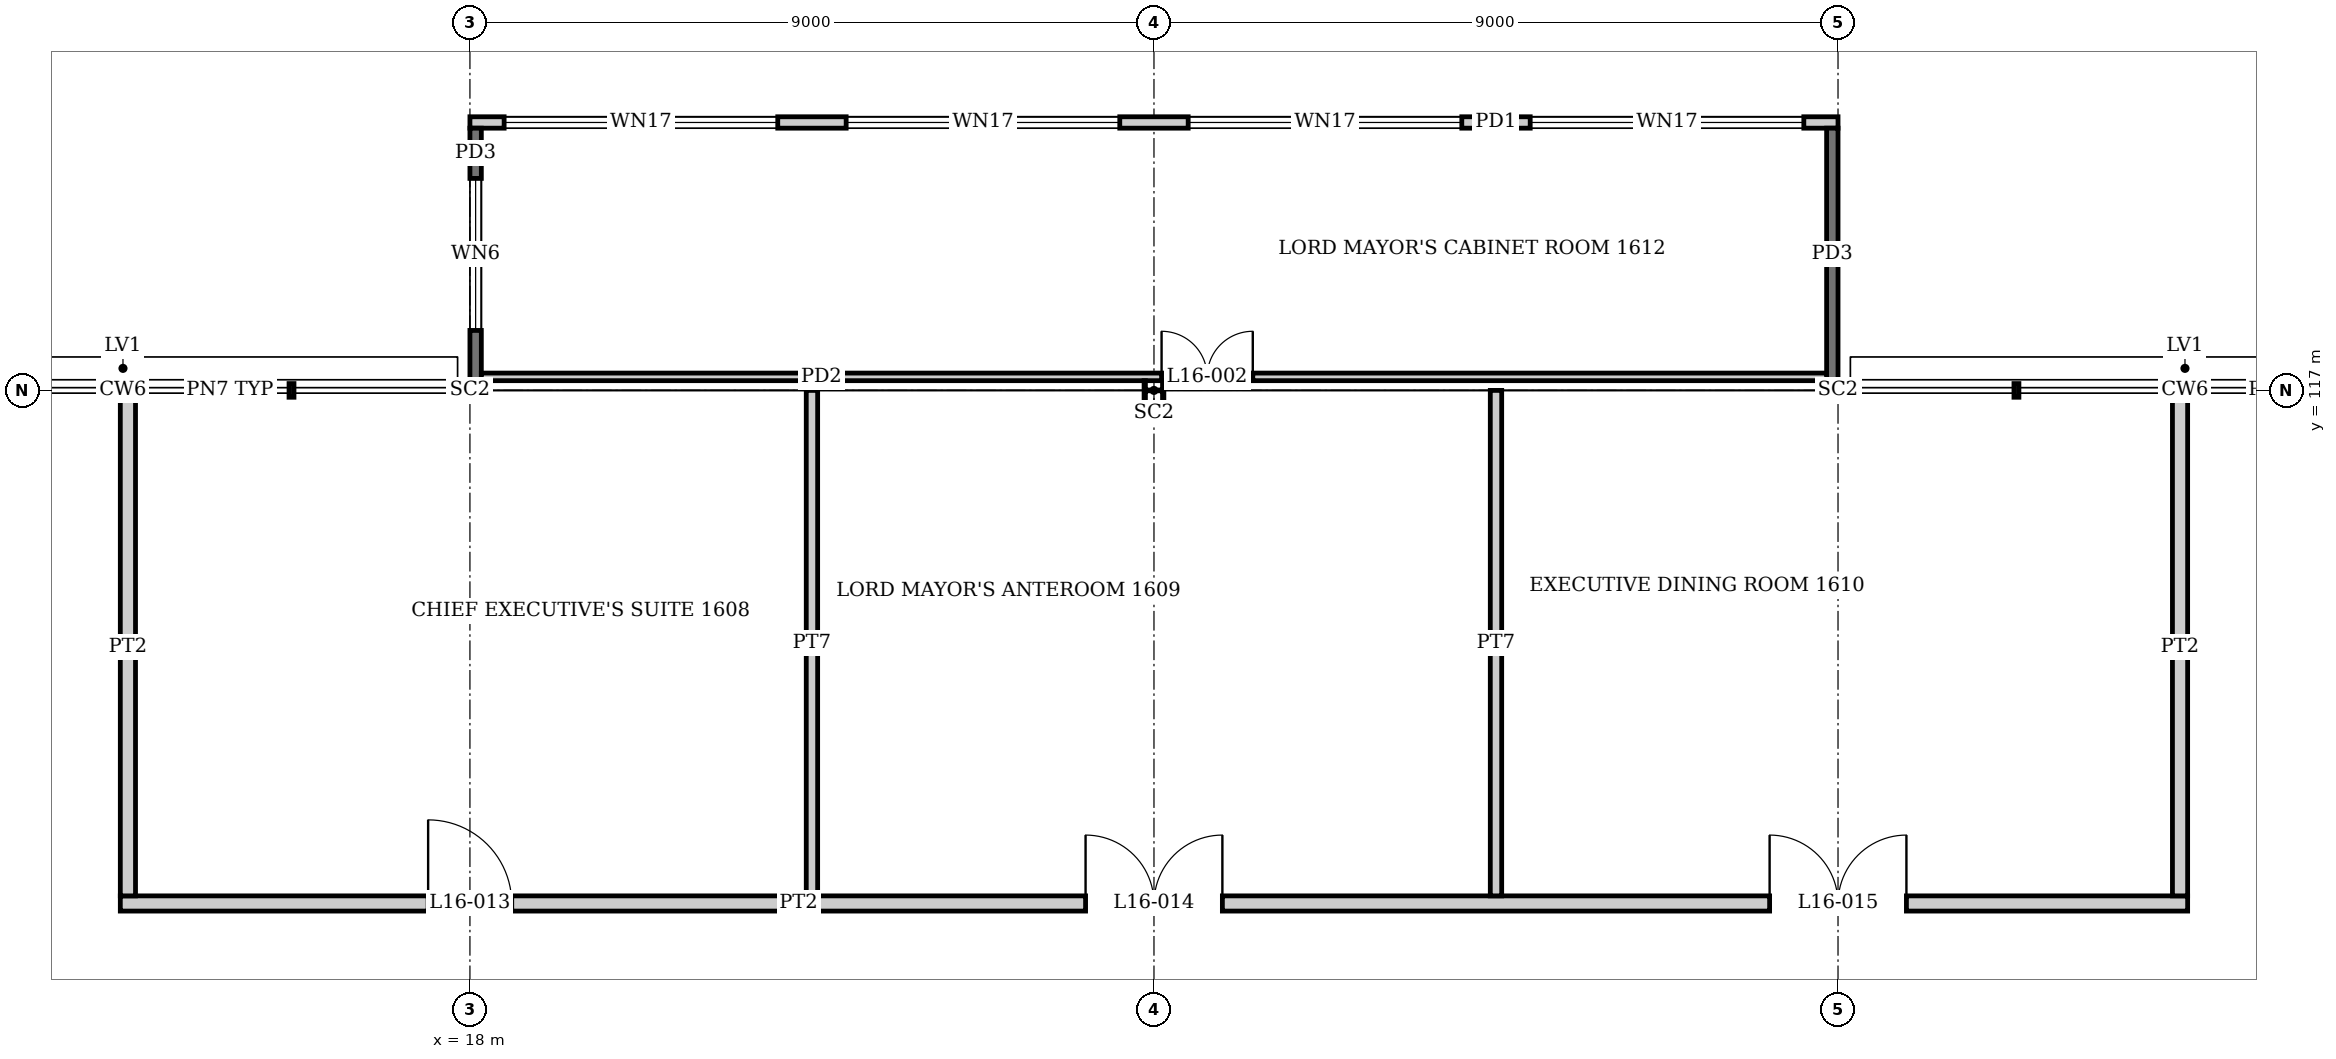
"""IFC4 building model, lengths in metres.
Left out: names, types, materials, properties, quantities, classifications, styles, units other than length and angle.
Written with IfcOpenShell. Run it as: python <this file> out.ifc"""

import sys

from ifc_helpers import new_model, si_unit, direction, frame, frame_2d, origin, origin_2d, place, context, subcontext, project, spatial, rectangle, i_section, extrude, element, fill, save


model = new_model("IFC4")
c1 = context("Model", 3, precision=1e-05, world=origin(), true_north=direction((0.0, 1.0)))
c2 = subcontext(c1, "Body", "Model", "MODEL_VIEW")
j1 = project(units=[si_unit("LENGTHUNIT", "METRE"), si_unit("PLANEANGLEUNIT", "RADIAN")], contexts=[c1])
p1 = place(None, origin())
s1 = spatial("IfcSite", under=j1, at=p1, CompositionType="ELEMENT")
p2 = place(p1, origin())
s2 = spatial("IfcBuilding", under=s1, at=p2, CompositionType="ELEMENT")
p3 = place(p2, frame((0.0, 0.0, 67.2)))
s3 = spatial("IfcBuildingStorey", under=s2, at=p3, CompositionType="ELEMENT", Elevation=67.2)
for number, where, z_axis, x_axis in (
    (1, (18.0, 117.0, 0.0), (0.0, 0.0, 1.0), (0.0, 1.0, 0.0)),
    (2, (27.0, 117.0, 0.0), (0.0, 0.0, 1.0), (0.0, 1.0, 0.0)),
    (3, (36.0, 117.0, 0.0), (0.0, 0.0, 1.0), (0.0, 1.0, 0.0)),
):
    element("IfcColumn", number, at=place(p3, frame(where, z_axis=z_axis, x_axis=x_axis)), inside=s3, PredefinedType="COLUMN", context=c2, shape_type="SweptSolid", body=[
        extrude(i_section(OverallWidth=0.256, OverallDepth=0.26, WebThickness=0.01, FlangeThickness=0.017, at=origin_2d()), origin(), (0.0, 0.0, 1.0), 4.0),
    ])
p4 = place(p3, frame((18.0, 120.525, 0.0), z_axis=(0.0, 0.0, 1.0), x_axis=(1.0, 0.0, 0.0)))
e4 = element("IfcWall", 4, at=p4, inside=s3, PredefinedType="SOLIDWALL", context=c2, shape_type="SweptSolid", body=[
    extrude(rectangle(XDim=18.0, YDim=0.15, at=frame_2d((9.0, 0.0))), origin(), (0.0, 0.0, 1.0), 2.6),
])
p5 = place(p4, frame((0.45, 0.0, 0.6)))
e5 = element("IfcOpeningElement", 5, at=p5, cuts=e4, PredefinedType="OPENING", context=c2, shape_type="SweptSolid", body=[
    extrude(rectangle(XDim=3.6, YDim=1.8, at=frame_2d((1.8, 0.9))), frame((0.0, 0.085, 0.0), z_axis=(0.0, -1.0, 0.0), x_axis=(1.0, 0.0, 0.0)), (0.0, 0.0, 1.0), 0.17),
])
p6 = place(p4, frame((4.95, 0.0, 0.6)))
e6 = element("IfcOpeningElement", 6, at=p6, cuts=e4, PredefinedType="OPENING", context=c2, shape_type="SweptSolid", body=[
    extrude(rectangle(XDim=3.6, YDim=1.8, at=frame_2d((1.8, 0.9))), frame((0.0, 0.085, 0.0), z_axis=(0.0, -1.0, 0.0), x_axis=(1.0, 0.0, 0.0)), (0.0, 0.0, 1.0), 0.17),
])
p7 = place(p4, frame((9.45, 0.0, 0.6)))
e7 = element("IfcOpeningElement", 7, at=p7, cuts=e4, PredefinedType="OPENING", context=c2, shape_type="SweptSolid", body=[
    extrude(rectangle(XDim=3.6, YDim=1.8, at=frame_2d((1.8, 0.9))), frame((0.0, 0.085, 0.0), z_axis=(0.0, -1.0, 0.0), x_axis=(1.0, 0.0, 0.0)), (0.0, 0.0, 1.0), 0.17),
])
p8 = place(p4, frame((13.95, 0.0, 0.6)))
e8 = element("IfcOpeningElement", 8, at=p8, cuts=e4, PredefinedType="OPENING", context=c2, shape_type="SweptSolid", body=[
    extrude(rectangle(XDim=3.6, YDim=1.8, at=frame_2d((1.8, 0.9))), frame((0.0, 0.085, 0.0), z_axis=(0.0, -1.0, 0.0), x_axis=(1.0, 0.0, 0.0)), (0.0, 0.0, 1.0), 0.17),
])
p9 = place(p3, frame((18.075, 120.45, -0.15), z_axis=(0.0, 0.0, 1.0), x_axis=(0.0, -1.0, 0.0)))
e9 = element("IfcWall", 9, at=p9, inside=s3, PredefinedType="SOLIDWALL", context=c2, shape_type="SweptSolid", body=[
    extrude(rectangle(XDim=3.322, YDim=0.15, at=frame_2d((1.661, 0.0))), origin(), (0.0, 0.0, 1.0), 2.75),
])
p10 = place(p9, frame((0.661, 0.0, 1.05)))
e10 = element("IfcOpeningElement", 10, at=p10, cuts=e9, PredefinedType="OPENING", context=c2, shape_type="SweptSolid", body=[
    extrude(rectangle(XDim=2.0, YDim=1.4, at=frame_2d((1.0, 0.7))), frame((0.0, 0.085, 0.0), z_axis=(0.0, -1.0, 0.0), x_axis=(1.0, 0.0, 0.0)), (0.0, 0.0, 1.0), 0.17),
])
p11 = place(p3, frame((35.925, 120.45, -0.15), z_axis=(0.0, 0.0, 1.0), x_axis=(0.0, -1.0, 0.0)))
e11 = element("IfcWall", 11, at=p11, inside=s3, PredefinedType="SOLIDWALL", context=c2, shape_type="SweptSolid", body=[
    extrude(rectangle(XDim=3.322, YDim=0.15, at=frame_2d((1.661, 0.0))), origin(), (0.0, 0.0, 1.0), 2.75),
])
p12 = place(p3, frame((18.15, 117.178, 0.0), z_axis=(0.0, 0.0, 1.0), x_axis=(1.0, 0.0, 0.0)))
e12 = element("IfcWall", 12, at=p12, inside=s3, PredefinedType="PARTITIONING", context=c2, shape_type="SweptSolid", body=[
    extrude(rectangle(XDim=17.7, YDim=0.1, at=frame_2d((8.85, 0.0))), origin(), (0.0, 0.0, 1.0), 2.6),
])
p13 = place(p12, frame((8.95, 0.0, 0.0)))
e13 = element("IfcOpeningElement", 13, at=p13, cuts=e12, PredefinedType="OPENING", context=c2, shape_type="SweptSolid", body=[
    extrude(rectangle(XDim=1.2, YDim=2.1, at=frame_2d((0.6, 1.05))), frame((0.0, 0.06, 0.0), z_axis=(0.0, -1.0, 0.0), x_axis=(1.0, 0.0, 0.0)), (0.0, 0.0, 1.0), 0.12),
])
p14 = place(p3, frame((13.4, 110.25, 0.0), z_axis=(0.0, 0.0, 1.0), x_axis=(1.0, 0.0, 0.0)))
e14 = element("IfcWall", 14, at=p14, inside=s3, PredefinedType="PARTITIONING", context=c2, shape_type="SweptSolid", body=[
    extrude(rectangle(XDim=27.2, YDim=0.2, at=frame_2d((13.6, 0.0))), origin(), (0.0, 0.0, 1.0), 2.9),
])
p15 = place(p14, frame((4.05, 0.0, 0.0)))
e15 = element("IfcOpeningElement", 15, at=p15, cuts=e14, PredefinedType="OPENING", context=c2, shape_type="SweptSolid", body=[
    extrude(rectangle(XDim=1.1, YDim=2.4, at=frame_2d((0.55, 1.2))), frame((0.0, 0.11, 0.0), z_axis=(0.0, -1.0, 0.0), x_axis=(1.0, 0.0, 0.0)), (0.0, 0.0, 1.0), 0.22),
])
p16 = place(p14, frame((12.7, 0.0, 0.0)))
e16 = element("IfcOpeningElement", 16, at=p16, cuts=e14, PredefinedType="OPENING", context=c2, shape_type="SweptSolid", body=[
    extrude(rectangle(XDim=1.8, YDim=2.1, at=frame_2d((0.9, 1.05))), frame((0.0, 0.11, 0.0), z_axis=(0.0, -1.0, 0.0), x_axis=(1.0, 0.0, 0.0)), (0.0, 0.0, 1.0), 0.22),
])
p17 = place(p14, frame((21.7, 0.0, 0.0)))
e17 = element("IfcOpeningElement", 17, at=p17, cuts=e14, PredefinedType="OPENING", context=c2, shape_type="SweptSolid", body=[
    extrude(rectangle(XDim=1.8, YDim=2.1, at=frame_2d((0.9, 1.05))), frame((0.0, 0.11, 0.0), z_axis=(0.0, -1.0, 0.0), x_axis=(1.0, 0.0, 0.0)), (0.0, 0.0, 1.0), 0.22),
])
p18 = place(p3, frame((13.5, 110.35, 0.0), z_axis=(0.0, 0.0, 1.0), x_axis=(0.0, 1.0, 0.0)))
e18 = element("IfcWall", 18, at=p18, inside=s3, PredefinedType="PARTITIONING", context=c2, shape_type="SweptSolid", body=[
    extrude(rectangle(XDim=6.56, YDim=0.2, at=frame_2d((3.28, 0.0))), origin(), (0.0, 0.0, 1.0), 2.9),
])
for number, where, z_axis, x_axis in (
    (19, (22.5, 110.35, 0.0), (0.0, 0.0, 1.0), (0.0, 1.0, 0.0)),
    (20, (31.5, 110.35, 0.0), (0.0, 0.0, 1.0), (0.0, 1.0, 0.0)),
):
    element("IfcWall", number, at=place(p3, frame(where, z_axis=z_axis, x_axis=x_axis)), inside=s3, PredefinedType="PARTITIONING", context=c2, shape_type="SweptSolid", body=[
        extrude(rectangle(XDim=6.65, YDim=0.15, at=frame_2d((3.325, 0.0))), origin(), (0.0, 0.0, 1.0), 2.9),
    ])
p19 = place(p3, frame((40.5, 110.35, 0.0), z_axis=(0.0, 0.0, 1.0), x_axis=(0.0, 1.0, 0.0)))
e21 = element("IfcWall", 21, at=p19, inside=s3, PredefinedType="PARTITIONING", context=c2, shape_type="SweptSolid", body=[
    extrude(rectangle(XDim=6.56, YDim=0.2, at=frame_2d((3.28, 0.0))), origin(), (0.0, 0.0, 1.0), 2.9),
])
p20 = place(p5, origin())
e22 = element("IfcWindow", 22, at=p20, inside=s3, PartitioningType="SINGLE_PANEL", PredefinedType="WINDOW", context=c2, shape_type="SweptSolid", body=[
    extrude(rectangle(XDim=3.6, YDim=1.8, at=frame_2d((1.8, 0.9))), frame((0.0, 0.03, 0.0), z_axis=(0.0, -1.0, 0.0), x_axis=(1.0, 0.0, 0.0)), (0.0, 0.0, 1.0), 0.06),
])
fill(e5, e22)
p21 = place(p6, origin())
e23 = element("IfcWindow", 23, at=p21, inside=s3, PartitioningType="SINGLE_PANEL", PredefinedType="WINDOW", context=c2, shape_type="SweptSolid", body=[
    extrude(rectangle(XDim=3.6, YDim=1.8, at=frame_2d((1.8, 0.9))), frame((0.0, 0.03, 0.0), z_axis=(0.0, -1.0, 0.0), x_axis=(1.0, 0.0, 0.0)), (0.0, 0.0, 1.0), 0.06),
])
fill(e6, e23)
p22 = place(p7, origin())
e24 = element("IfcWindow", 24, at=p22, inside=s3, PartitioningType="SINGLE_PANEL", PredefinedType="WINDOW", context=c2, shape_type="SweptSolid", body=[
    extrude(rectangle(XDim=3.6, YDim=1.8, at=frame_2d((1.8, 0.9))), frame((0.0, 0.03, 0.0), z_axis=(0.0, -1.0, 0.0), x_axis=(1.0, 0.0, 0.0)), (0.0, 0.0, 1.0), 0.06),
])
fill(e7, e24)
p23 = place(p8, origin())
e25 = element("IfcWindow", 25, at=p23, inside=s3, PartitioningType="SINGLE_PANEL", PredefinedType="WINDOW", context=c2, shape_type="SweptSolid", body=[
    extrude(rectangle(XDim=3.6, YDim=1.8, at=frame_2d((1.8, 0.9))), frame((0.0, 0.03, 0.0), z_axis=(0.0, -1.0, 0.0), x_axis=(1.0, 0.0, 0.0)), (0.0, 0.0, 1.0), 0.06),
])
fill(e8, e25)
p24 = place(p10, origin())
e26 = element("IfcWindow", 26, at=p24, inside=s3, PartitioningType="SINGLE_PANEL", PredefinedType="WINDOW", context=c2, shape_type="SweptSolid", body=[
    extrude(rectangle(XDim=2.0, YDim=1.4, at=frame_2d((1.0, 0.7))), frame((0.0, 0.03, 0.0), z_axis=(0.0, -1.0, 0.0), x_axis=(1.0, 0.0, 0.0)), (0.0, 0.0, 1.0), 0.06),
])
fill(e10, e26)
p25 = place(p13, origin())
e27 = element("IfcDoor", 27, at=p25, inside=s3, OperationType="DOUBLE_DOOR_SINGLE_SWING", PredefinedType="DOOR", context=c2, shape_type="SweptSolid", body=[
    extrude(rectangle(XDim=1.2, YDim=2.1, at=frame_2d((0.6, 1.05))), frame((0.0, 0.025, 0.0), z_axis=(0.0, -1.0, 0.0), x_axis=(1.0, 0.0, 0.0)), (0.0, 0.0, 1.0), 0.05),
])
fill(e13, e27)
p26 = place(p15, origin())
e28 = element("IfcDoor", 28, at=p26, inside=s3, OperationType="SINGLE_SWING_LEFT", PredefinedType="DOOR", context=c2, shape_type="SweptSolid", body=[
    extrude(rectangle(XDim=1.1, YDim=2.4, at=frame_2d((0.55, 1.2))), frame((0.0, 0.025, 0.0), z_axis=(0.0, -1.0, 0.0), x_axis=(1.0, 0.0, 0.0)), (0.0, 0.0, 1.0), 0.05),
])
fill(e15, e28)
p27 = place(p16, origin())
e29 = element("IfcDoor", 29, at=p27, inside=s3, OperationType="DOUBLE_DOOR_SINGLE_SWING", PredefinedType="DOOR", context=c2, shape_type="SweptSolid", body=[
    extrude(rectangle(XDim=1.8, YDim=2.1, at=frame_2d((0.9, 1.05))), frame((0.0, 0.025, 0.0), z_axis=(0.0, -1.0, 0.0), x_axis=(1.0, 0.0, 0.0)), (0.0, 0.0, 1.0), 0.05),
])
fill(e16, e29)
p28 = place(p17, origin())
e30 = element("IfcDoor", 30, at=p28, inside=s3, OperationType="DOUBLE_DOOR_SINGLE_SWING", PredefinedType="DOOR", context=c2, shape_type="SweptSolid", body=[
    extrude(rectangle(XDim=1.8, YDim=2.1, at=frame_2d((0.9, 1.05))), frame((0.0, 0.025, 0.0), z_axis=(0.0, -1.0, 0.0), x_axis=(1.0, 0.0, 0.0)), (0.0, 0.0, 1.0), 0.05),
])
fill(e17, e30)
save(model, sys.argv[1])
